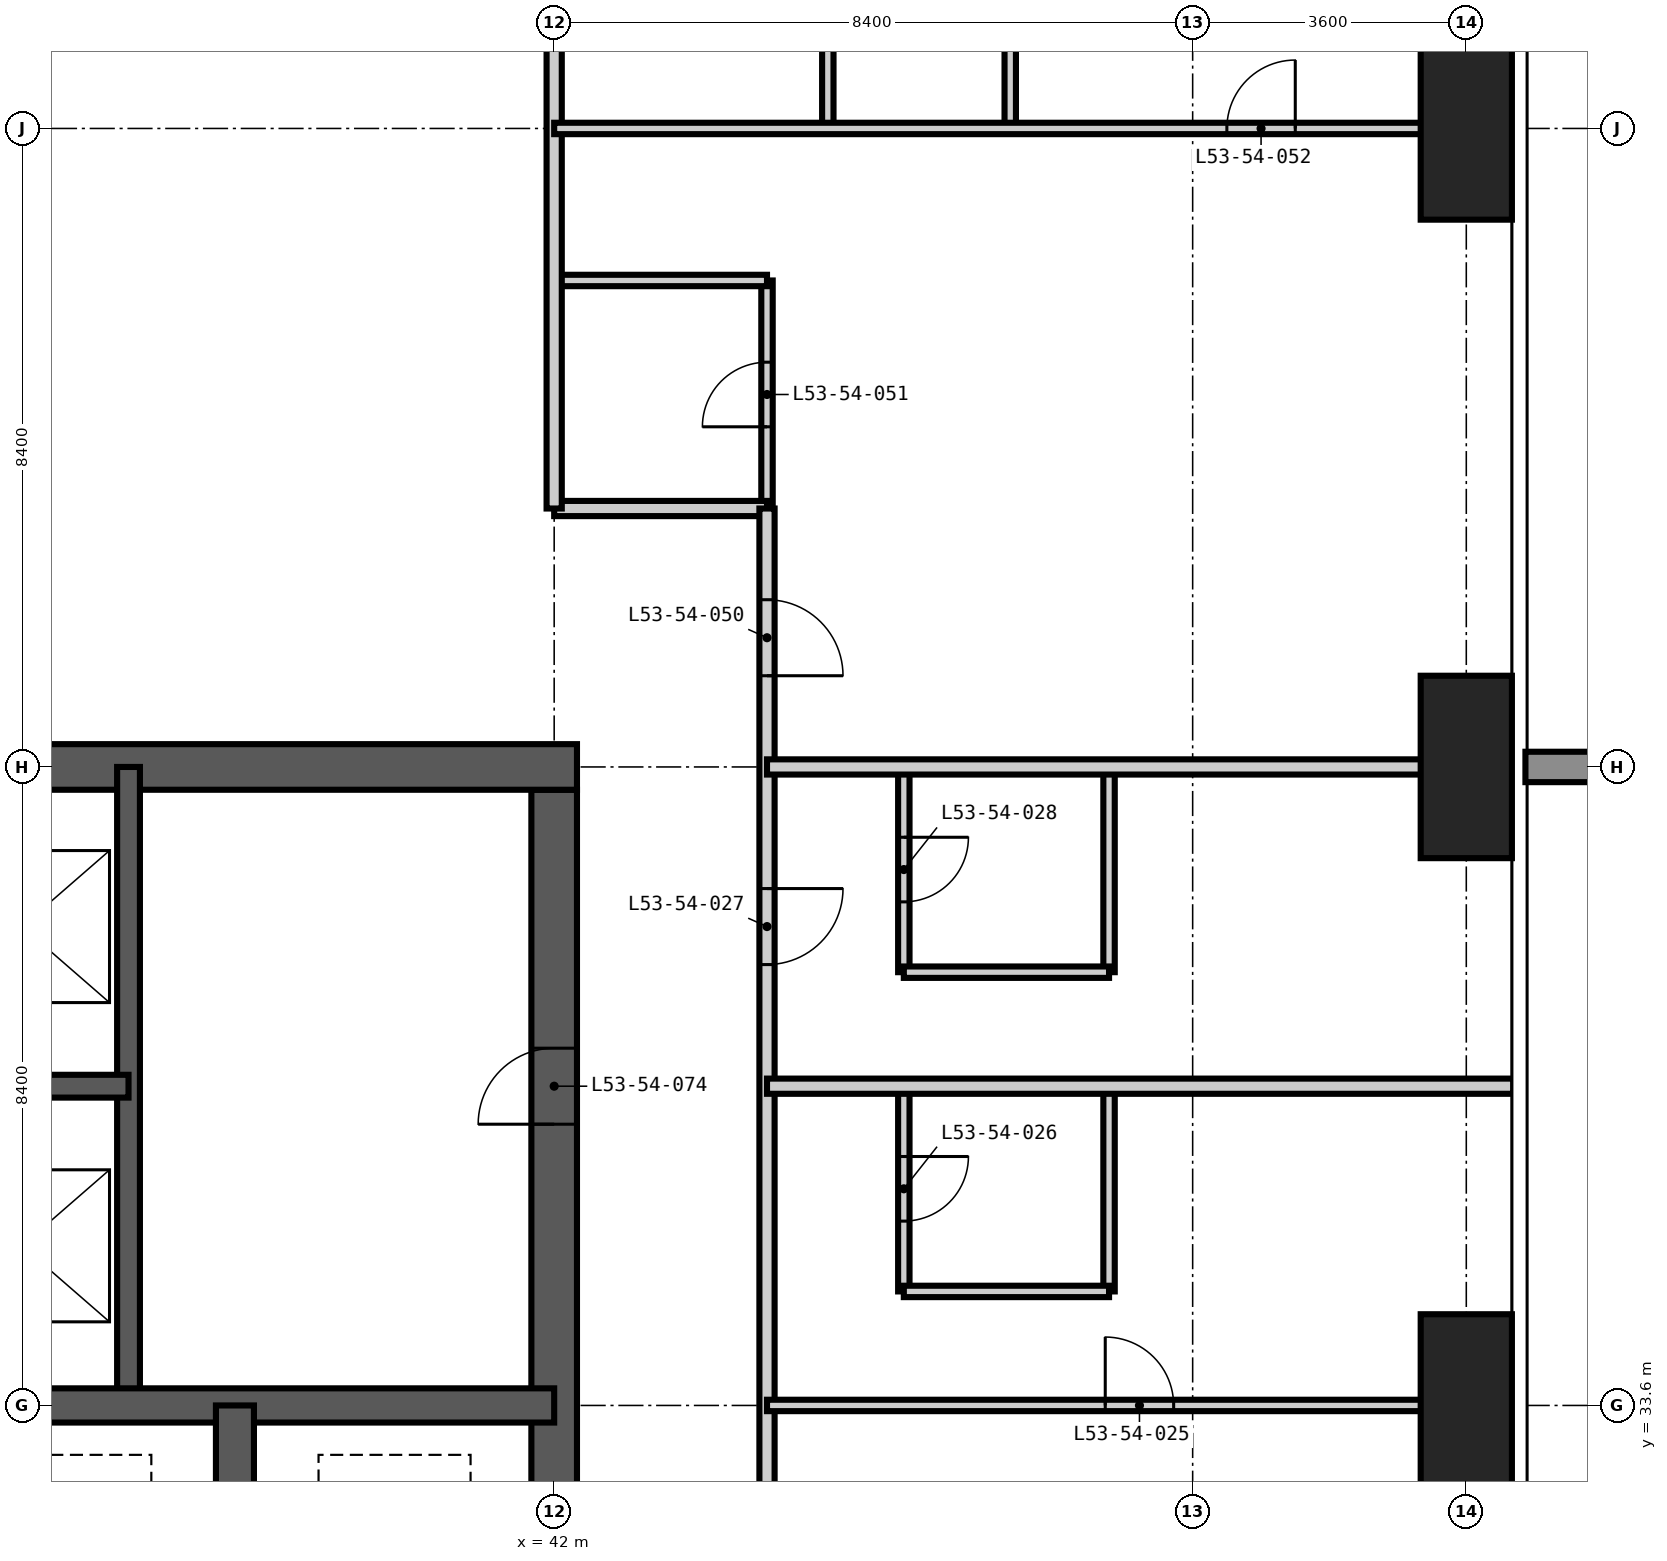
"""IFC4 building model, lengths in metres.
Left out: names, types, materials, properties, quantities, classifications, styles, units other than length and angle.
Written with IfcOpenShell. Run it as: python <this file> out.ifc"""

import sys

from ifc_helpers import new_model, si_unit, direction, frame, frame_2d, origin, origin_2d, place, context, subcontext, project, spatial, rectangle, extrude, element, fill, save


model = new_model("IFC4")
c1 = context("Model", 3, precision=1e-05, world=origin(), true_north=direction((0.0, 1.0)))
c2 = subcontext(c1, "Body", "Model", "MODEL_VIEW")
j1 = project(units=[si_unit("LENGTHUNIT", "METRE"), si_unit("PLANEANGLEUNIT", "RADIAN")], contexts=[c1])
p1 = place(None, origin())
s1 = spatial("IfcSite", under=j1, at=p1, CompositionType="ELEMENT")
p2 = place(p1, origin())
s2 = spatial("IfcBuilding", under=s1, at=p2, CompositionType="ELEMENT")
p3 = place(p2, frame((0.0, 0.0, 205.8)))
s3 = spatial("IfcBuildingStorey", under=s2, at=p3, CompositionType="ELEMENT", Elevation=205.8)
for number, where, z_axis, x_axis in (
    (1, (54.0, 33.6, -0.35), (0.0, 0.0, 1.0), (1.0, 0.0, 0.0)),
    (2, (54.0, 42.0, -0.35), (0.0, 0.0, 1.0), (1.0, 0.0, 0.0)),
    (3, (54.0, 50.4, -0.35), (0.0, 0.0, 1.0), (1.0, 0.0, 0.0)),
):
    element("IfcColumn", number, at=place(p3, frame(where, z_axis=z_axis, x_axis=x_axis)), inside=s3, PredefinedType="COLUMN", context=c2, shape_type="SweptSolid", body=[
        extrude(rectangle(XDim=1.2, YDim=2.4, at=origin_2d()), origin(), (0.0, 0.0, 1.0), 3.6),
    ])
p4 = place(p3, frame((42.0, 17.1, -0.35), z_axis=(0.0, 0.0, 1.0), x_axis=(0.0, 1.0, 0.0)))
e4 = element("IfcWall", 4, at=p4, inside=s3, PredefinedType="SHEAR", context=c2, shape_type="SweptSolid", body=[
    extrude(rectangle(XDim=24.6, YDim=0.6, at=frame_2d((12.3, 0.0))), origin(), (0.0, 0.0, 1.0), 3.6),
])
p5 = place(p4, frame((0.5, 0.0, 0.35)))
e5 = element("IfcOpeningElement", 5, at=p5, cuts=e4, PredefinedType="OPENING", context=c2, shape_type="SweptSolid", body=[
    extrude(rectangle(XDim=1.2, YDim=2.2, at=frame_2d((0.6, 1.1))), frame((0.0, 0.31, 0.0), z_axis=(0.0, -1.0, 0.0), x_axis=(1.0, 0.0, 0.0)), (0.0, 0.0, 1.0), 0.62),
])
p6 = place(p4, frame((11.8, 0.0, 0.35)))
e6 = element("IfcOpeningElement", 6, at=p6, cuts=e4, PredefinedType="OPENING", context=c2, shape_type="SweptSolid", body=[
    extrude(rectangle(XDim=1.0, YDim=2.1, at=frame_2d((0.5, 1.05))), frame((0.0, 0.31, 0.0), z_axis=(0.0, -1.0, 0.0), x_axis=(1.0, 0.0, 0.0)), (0.0, 0.0, 1.0), 0.62),
])
p7 = place(p4, frame((20.2, 0.0, 0.35)))
e7 = element("IfcOpeningElement", 7, at=p7, cuts=e4, PredefinedType="OPENING", context=c2, shape_type="SweptSolid", body=[
    extrude(rectangle(XDim=1.0, YDim=2.1, at=frame_2d((0.5, 1.05))), frame((0.0, 0.31, 0.0), z_axis=(0.0, -1.0, 0.0), x_axis=(1.0, 0.0, 0.0)), (0.0, 0.0, 1.0), 0.62),
])
p8 = place(p3, frame((42.3, 42.0, -0.35), z_axis=(0.0, 0.0, 1.0), x_axis=(-1.0, 0.0, 0.0)))
e8 = element("IfcWall", 8, at=p8, inside=s3, PredefinedType="SHEAR", context=c2, shape_type="SweptSolid", body=[
    extrude(rectangle(XDim=25.8, YDim=0.6, at=frame_2d((12.9, 0.0))), origin(), (0.0, 0.0, 1.0), 3.6),
])
p9 = place(p8, frame((20.8, 0.0, 0.35)))
e9 = element("IfcOpeningElement", 9, at=p9, cuts=e8, PredefinedType="OPENING", context=c2, shape_type="SweptSolid", body=[
    extrude(rectangle(XDim=1.0, YDim=2.1, at=frame_2d((0.5, 1.05))), frame((0.0, 0.31, 0.0), z_axis=(0.0, -1.0, 0.0), x_axis=(1.0, 0.0, 0.0)), (0.0, 0.0, 1.0), 0.62),
])
p10 = place(p8, frame((10.2, 0.0, 0.35)))
e10 = element("IfcOpeningElement", 10, at=p10, cuts=e8, PredefinedType="OPENING", context=c2, shape_type="SweptSolid", body=[
    extrude(rectangle(XDim=1.2, YDim=2.2, at=frame_2d((0.6, 1.1))), frame((0.0, 0.31, 0.0), z_axis=(0.0, -1.0, 0.0), x_axis=(1.0, 0.0, 0.0)), (0.0, 0.0, 1.0), 0.62),
])
p11 = place(p3, frame((36.4, 33.6, -0.35), z_axis=(0.0, 0.0, 1.0), x_axis=(0.0, 1.0, 0.0)))
e11 = element("IfcWall", 11, at=p11, inside=s3, PredefinedType="SHEAR", context=c2, shape_type="SweptSolid", body=[
    extrude(rectangle(XDim=8.4, YDim=0.3, at=frame_2d((4.2, 0.0))), origin(), (0.0, 0.0, 1.0), 3.6),
])
p12 = place(p3, frame((33.6, 37.8, -0.35), z_axis=(0.0, 0.0, 1.0), x_axis=(1.0, 0.0, 0.0)))
e12 = element("IfcWall", 12, at=p12, inside=s3, PredefinedType="SHEAR", context=c2, shape_type="SweptSolid", body=[
    extrude(rectangle(XDim=2.8, YDim=0.3, at=frame_2d((1.4, 0.0))), origin(), (0.0, 0.0, 1.0), 3.6),
])
p13 = place(p3, frame((16.8, 33.6, -0.35), z_axis=(0.0, 0.0, 1.0), x_axis=(1.0, 0.0, 0.0)))
e13 = element("IfcWall", 13, at=p13, inside=s3, PredefinedType="SHEAR", context=c2, shape_type="SweptSolid", body=[
    extrude(rectangle(XDim=25.2, YDim=0.45, at=frame_2d((12.6, 0.0))), origin(), (0.0, 0.0, 1.0), 3.6),
])
p14 = place(p3, frame((37.8, 30.8, -0.35), z_axis=(0.0, 0.0, 1.0), x_axis=(0.0, 1.0, 0.0)))
e14 = element("IfcWall", 14, at=p14, inside=s3, PredefinedType="SHEAR", context=c2, shape_type="SweptSolid", body=[
    extrude(rectangle(XDim=2.8, YDim=0.5, at=frame_2d((1.4, 0.0))), origin(), (0.0, 0.0, 1.0), 3.6),
])
p15 = place(p3, frame((44.8, 45.4, 0.0), z_axis=(0.0, 0.0, 1.0), x_axis=(0.0, 1.0, 0.0)))
e15 = element("IfcWall", 15, at=p15, inside=s3, PredefinedType="PARTITIONING", context=c2, shape_type="SweptSolid", body=[
    extrude(rectangle(XDim=3.0, YDim=0.15, at=frame_2d((1.5, 0.0))), origin(), (0.0, 0.0, 1.0), 3.25),
])
p16 = place(p15, frame((1.075, 0.0, 0.0)))
e16 = element("IfcOpeningElement", 16, at=p16, cuts=e15, PredefinedType="OPENING", context=c2, shape_type="SweptSolid", body=[
    extrude(rectangle(XDim=0.85, YDim=2.1, at=frame_2d((0.425, 1.05))), frame((0.0, 0.085, 0.0), z_axis=(0.0, -1.0, 0.0), x_axis=(1.0, 0.0, 0.0)), (0.0, 0.0, 1.0), 0.17),
])
p17 = place(p3, frame((46.6, 35.1, 0.0), z_axis=(0.0, 0.0, 1.0), x_axis=(0.0, 1.0, 0.0)))
e17 = element("IfcWall", 17, at=p17, inside=s3, PredefinedType="PARTITIONING", context=c2, shape_type="SweptSolid", body=[
    extrude(rectangle(XDim=2.7, YDim=0.15, at=frame_2d((1.35, 0.0))), origin(), (0.0, 0.0, 1.0), 3.25),
])
p18 = place(p17, frame((0.925, 0.0, 0.0)))
e18 = element("IfcOpeningElement", 18, at=p18, cuts=e17, PredefinedType="OPENING", context=c2, shape_type="SweptSolid", body=[
    extrude(rectangle(XDim=0.85, YDim=2.1, at=frame_2d((0.425, 1.05))), frame((0.0, 0.085, 0.0), z_axis=(0.0, -1.0, 0.0), x_axis=(1.0, 0.0, 0.0)), (0.0, 0.0, 1.0), 0.17),
])
p19 = place(p3, frame((46.6, 39.3, 0.0), z_axis=(0.0, 0.0, 1.0), x_axis=(0.0, 1.0, 0.0)))
e19 = element("IfcWall", 19, at=p19, inside=s3, PredefinedType="PARTITIONING", context=c2, shape_type="SweptSolid", body=[
    extrude(rectangle(XDim=2.7, YDim=0.15, at=frame_2d((1.35, 0.0))), origin(), (0.0, 0.0, 1.0), 3.25),
])
p20 = place(p19, frame((0.925, 0.0, 0.0)))
e20 = element("IfcOpeningElement", 20, at=p20, cuts=e19, PredefinedType="OPENING", context=c2, shape_type="SweptSolid", body=[
    extrude(rectangle(XDim=0.85, YDim=2.1, at=frame_2d((0.425, 1.05))), frame((0.0, 0.085, 0.0), z_axis=(0.0, -1.0, 0.0), x_axis=(1.0, 0.0, 0.0)), (0.0, 0.0, 1.0), 0.17),
])
for number, where, z_axis, x_axis in (
    (21, (49.3, 35.1, 0.0), (0.0, 0.0, 1.0), (0.0, 1.0, 0.0)),
    (22, (49.3, 39.3, 0.0), (0.0, 0.0, 1.0), (0.0, 1.0, 0.0)),
    (23, (46.6, 35.1, 0.0), (0.0, 0.0, 1.0), (1.0, 0.0, 0.0)),
    (24, (46.6, 39.3, 0.0), (0.0, 0.0, 1.0), (1.0, 0.0, 0.0)),
):
    element("IfcWall", number, at=place(p3, frame(where, z_axis=z_axis, x_axis=x_axis)), inside=s3, PredefinedType="PARTITIONING", context=c2, shape_type="SweptSolid", body=[
        extrude(rectangle(XDim=2.7, YDim=0.15, at=frame_2d((1.35, 0.0))), origin(), (0.0, 0.0, 1.0), 3.25),
    ])
p21 = place(p3, frame((42.0, 48.4, 0.0), z_axis=(0.0, 0.0, 1.0), x_axis=(1.0, 0.0, 0.0)))
e25 = element("IfcWall", 25, at=p21, inside=s3, PredefinedType="PARTITIONING", context=c2, shape_type="SweptSolid", body=[
    extrude(rectangle(XDim=2.8, YDim=0.15, at=frame_2d((1.4, 0.0))), origin(), (0.0, 0.0, 1.0), 3.25),
])
p22 = place(p3, frame((42.0, 45.4, 0.0), z_axis=(0.0, 0.0, 1.0), x_axis=(1.0, 0.0, 0.0)))
e26 = element("IfcWall", 26, at=p22, inside=s3, PredefinedType="PARTITIONING", context=c2, shape_type="SweptSolid", body=[
    extrude(rectangle(XDim=2.8, YDim=0.2, at=frame_2d((1.4, 0.0))), origin(), (0.0, 0.0, 1.0), 3.25),
])
p23 = place(p3, frame((42.0, 54.618, 0.0), z_axis=(0.0, 0.0, 1.0), x_axis=(0.0, -1.0, 0.0)))
e27 = element("IfcWall", 27, at=p23, inside=s3, PredefinedType="PARTITIONING", context=c2, shape_type="SweptSolid", body=[
    extrude(rectangle(XDim=9.218, YDim=0.2, at=frame_2d((4.609, 0.0))), origin(), (0.0, 0.0, 1.0), 3.25),
])
p24 = place(p3, frame((44.8, 45.4, 0.0), z_axis=(0.0, 0.0, 1.0), x_axis=(0.0, -1.0, 0.0)))
e28 = element("IfcWall", 28, at=p24, inside=s3, PredefinedType="PARTITIONING", context=c2, shape_type="SweptSolid", body=[
    extrude(rectangle(XDim=30.8, YDim=0.2, at=frame_2d((15.4, 0.0))), origin(), (0.0, 0.0, 1.0), 3.25),
])
p25 = place(p24, frame((26.0, 0.0, 0.0)))
e29 = element("IfcOpeningElement", 29, at=p25, cuts=e28, PredefinedType="OPENING", context=c2, shape_type="SweptSolid", body=[
    extrude(rectangle(XDim=1.0, YDim=2.2, at=frame_2d((0.5, 1.1))), frame((0.0, 0.11, 0.0), z_axis=(0.0, -1.0, 0.0), x_axis=(1.0, 0.0, 0.0)), (0.0, 0.0, 1.0), 0.22),
])
p26 = place(p24, frame((21.8, 0.0, 0.0)))
e30 = element("IfcOpeningElement", 30, at=p26, cuts=e28, PredefinedType="OPENING", context=c2, shape_type="SweptSolid", body=[
    extrude(rectangle(XDim=1.0, YDim=2.2, at=frame_2d((0.5, 1.1))), frame((0.0, 0.11, 0.0), z_axis=(0.0, -1.0, 0.0), x_axis=(1.0, 0.0, 0.0)), (0.0, 0.0, 1.0), 0.22),
])
p27 = place(p24, frame((16.7, 0.0, 0.0)))
e31 = element("IfcOpeningElement", 31, at=p27, cuts=e28, PredefinedType="OPENING", context=c2, shape_type="SweptSolid", body=[
    extrude(rectangle(XDim=1.0, YDim=2.2, at=frame_2d((0.5, 1.1))), frame((0.0, 0.11, 0.0), z_axis=(0.0, -1.0, 0.0), x_axis=(1.0, 0.0, 0.0)), (0.0, 0.0, 1.0), 0.22),
])
p28 = place(p24, frame((5.0, 0.0, 0.0)))
e32 = element("IfcOpeningElement", 32, at=p28, cuts=e28, PredefinedType="OPENING", context=c2, shape_type="SweptSolid", body=[
    extrude(rectangle(XDim=1.0, YDim=2.2, at=frame_2d((0.5, 1.1))), frame((0.0, 0.11, 0.0), z_axis=(0.0, -1.0, 0.0), x_axis=(1.0, 0.0, 0.0)), (0.0, 0.0, 1.0), 0.22),
])
p29 = place(p24, frame((29.2, 0.0, 0.0)))
e33 = element("IfcOpeningElement", 33, at=p29, cuts=e28, PredefinedType="OPENING", context=c2, shape_type="SweptSolid", body=[
    extrude(rectangle(XDim=1.0, YDim=2.2, at=frame_2d((0.5, 1.1))), frame((0.0, 0.11, 0.0), z_axis=(0.0, -1.0, 0.0), x_axis=(1.0, 0.0, 0.0)), (0.0, 0.0, 1.0), 0.22),
])
p30 = place(p24, frame((1.2, 0.0, 0.0)))
e34 = element("IfcOpeningElement", 34, at=p30, cuts=e28, PredefinedType="OPENING", context=c2, shape_type="SweptSolid", body=[
    extrude(rectangle(XDim=1.0, YDim=2.2, at=frame_2d((0.5, 1.1))), frame((0.0, 0.11, 0.0), z_axis=(0.0, -1.0, 0.0), x_axis=(1.0, 0.0, 0.0)), (0.0, 0.0, 1.0), 0.22),
])
for number, where, z_axis, x_axis in (
    (35, (44.8, 37.8, 0.0), (0.0, 0.0, 1.0), (1.0, 0.0, 0.0)),
    (36, (44.8, 42.0, 0.0), (0.0, 0.0, 1.0), (1.0, 0.0, 0.0)),
):
    element("IfcWall", number, at=place(p3, frame(where, z_axis=z_axis, x_axis=x_axis)), inside=s3, PredefinedType="PARTITIONING", context=c2, shape_type="SweptSolid", body=[
        extrude(rectangle(XDim=9.818, YDim=0.2, at=frame_2d((4.909, 0.0))), origin(), (0.0, 0.0, 1.0), 3.25),
    ])
p31 = place(p3, frame((45.6, 50.4, 0.0), z_axis=(0.0, 0.0, 1.0), x_axis=(0.0, 1.0, 0.0)))
e37 = element("IfcWall", 37, at=p31, inside=s3, PredefinedType="PARTITIONING", context=c2, shape_type="SweptSolid", body=[
    extrude(rectangle(XDim=3.0, YDim=0.15, at=frame_2d((1.5, 0.0))), origin(), (0.0, 0.0, 1.0), 3.25),
])
p32 = place(p3, frame((48.0, 50.4, 0.0), z_axis=(0.0, 0.0, 1.0), x_axis=(0.0, 1.0, 0.0)))
e38 = element("IfcWall", 38, at=p32, inside=s3, PredefinedType="PARTITIONING", context=c2, shape_type="SweptSolid", body=[
    extrude(rectangle(XDim=3.0, YDim=0.15, at=frame_2d((1.5, 0.0))), origin(), (0.0, 0.0, 1.0), 3.25),
])
p33 = place(p32, frame((1.05, 0.0, 0.0)))
e39 = element("IfcOpeningElement", 39, at=p33, cuts=e38, PredefinedType="OPENING", context=c2, shape_type="SweptSolid", body=[
    extrude(rectangle(XDim=0.9, YDim=2.1, at=frame_2d((0.45, 1.05))), frame((0.0, 0.085, 0.0), z_axis=(0.0, -1.0, 0.0), x_axis=(1.0, 0.0, 0.0)), (0.0, 0.0, 1.0), 0.17),
])
p34 = place(p3, frame((44.8, 33.6, 0.0), z_axis=(0.0, 0.0, 1.0), x_axis=(1.0, 0.0, 0.0)))
e40 = element("IfcWall", 40, at=p34, inside=s3, PredefinedType="PARTITIONING", context=c2, shape_type="SweptSolid", body=[
    extrude(rectangle(XDim=9.818, YDim=0.15, at=frame_2d((4.909, 0.0))), origin(), (0.0, 0.0, 1.0), 3.25),
])
p35 = place(p34, frame((4.45, 0.0, 0.0)))
e41 = element("IfcOpeningElement", 41, at=p35, cuts=e40, PredefinedType="OPENING", context=c2, shape_type="SweptSolid", body=[
    extrude(rectangle(XDim=0.9, YDim=2.1, at=frame_2d((0.45, 1.05))), frame((0.0, 0.085, 0.0), z_axis=(0.0, -1.0, 0.0), x_axis=(1.0, 0.0, 0.0)), (0.0, 0.0, 1.0), 0.17),
])
p36 = place(p3, frame((42.0, 50.4, 0.0), z_axis=(0.0, 0.0, 1.0), x_axis=(1.0, 0.0, 0.0)))
e42 = element("IfcWall", 42, at=p36, inside=s3, PredefinedType="PARTITIONING", context=c2, shape_type="SweptSolid", body=[
    extrude(rectangle(XDim=12.618, YDim=0.15, at=frame_2d((6.309, 0.0))), origin(), (0.0, 0.0, 1.0), 3.25),
])
p37 = place(p36, frame((8.85, 0.0, 0.0)))
e43 = element("IfcOpeningElement", 43, at=p37, cuts=e42, PredefinedType="OPENING", context=c2, shape_type="SweptSolid", body=[
    extrude(rectangle(XDim=0.9, YDim=2.1, at=frame_2d((0.45, 1.05))), frame((0.0, 0.085, 0.0), z_axis=(0.0, -1.0, 0.0), x_axis=(1.0, 0.0, 0.0)), (0.0, 0.0, 1.0), 0.17),
])
p38 = place(p35, origin())
e44 = element("IfcDoor", 44, at=p38, inside=s3, OperationType="SINGLE_SWING_LEFT", PredefinedType="DOOR", context=c2, shape_type="SweptSolid", body=[
    extrude(rectangle(XDim=0.9, YDim=2.1, at=frame_2d((0.45, 1.05))), frame((0.0, 0.025, 0.0), z_axis=(0.0, -1.0, 0.0), x_axis=(1.0, 0.0, 0.0)), (0.0, 0.0, 1.0), 0.05),
])
fill(e41, e44)
p39 = place(p18, frame((0.85, 0.0, 0.0), z_axis=(0.0, 0.0, 1.0), x_axis=(-1.0, 0.0, 0.0)))
e45 = element("IfcDoor", 45, at=p39, inside=s3, OperationType="SINGLE_SWING_LEFT", PredefinedType="DOOR", context=c2, shape_type="SweptSolid", body=[
    extrude(rectangle(XDim=0.85, YDim=2.1, at=frame_2d((0.425, 1.05))), frame((0.0, 0.025, 0.0), z_axis=(0.0, -1.0, 0.0), x_axis=(1.0, 0.0, 0.0)), (0.0, 0.0, 1.0), 0.05),
])
fill(e18, e45)
p40 = place(p28, origin())
e46 = element("IfcDoor", 46, at=p40, inside=s3, OperationType="SINGLE_SWING_LEFT", PredefinedType="DOOR", context=c2, shape_type="SweptSolid", body=[
    extrude(rectangle(XDim=1.0, YDim=2.2, at=frame_2d((0.5, 1.1))), frame((0.0, 0.025, 0.0), z_axis=(0.0, -1.0, 0.0), x_axis=(1.0, 0.0, 0.0)), (0.0, 0.0, 1.0), 0.05),
])
fill(e32, e46)
p41 = place(p20, frame((0.85, 0.0, 0.0), z_axis=(0.0, 0.0, 1.0), x_axis=(-1.0, 0.0, 0.0)))
e47 = element("IfcDoor", 47, at=p41, inside=s3, OperationType="SINGLE_SWING_LEFT", PredefinedType="DOOR", context=c2, shape_type="SweptSolid", body=[
    extrude(rectangle(XDim=0.85, YDim=2.1, at=frame_2d((0.425, 1.05))), frame((0.0, 0.025, 0.0), z_axis=(0.0, -1.0, 0.0), x_axis=(1.0, 0.0, 0.0)), (0.0, 0.0, 1.0), 0.05),
])
fill(e20, e47)
p42 = place(p30, origin())
e48 = element("IfcDoor", 48, at=p42, inside=s3, OperationType="SINGLE_SWING_RIGHT", PredefinedType="DOOR", context=c2, shape_type="SweptSolid", body=[
    extrude(rectangle(XDim=1.0, YDim=2.2, at=frame_2d((0.5, 1.1))), frame((0.0, 0.025, 0.0), z_axis=(0.0, -1.0, 0.0), x_axis=(1.0, 0.0, 0.0)), (0.0, 0.0, 1.0), 0.05),
])
fill(e34, e48)
p43 = place(p16, origin())
e49 = element("IfcDoor", 49, at=p43, inside=s3, OperationType="SINGLE_SWING_LEFT", PredefinedType="DOOR", context=c2, shape_type="SweptSolid", body=[
    extrude(rectangle(XDim=0.85, YDim=2.1, at=frame_2d((0.425, 1.05))), frame((0.0, 0.025, 0.0), z_axis=(0.0, -1.0, 0.0), x_axis=(1.0, 0.0, 0.0)), (0.0, 0.0, 1.0), 0.05),
])
fill(e16, e49)
p44 = place(p37, origin())
e50 = element("IfcDoor", 50, at=p44, inside=s3, OperationType="SINGLE_SWING_RIGHT", PredefinedType="DOOR", context=c2, shape_type="SweptSolid", body=[
    extrude(rectangle(XDim=0.9, YDim=2.1, at=frame_2d((0.45, 1.05))), frame((0.0, 0.025, 0.0), z_axis=(0.0, -1.0, 0.0), x_axis=(1.0, 0.0, 0.0)), (0.0, 0.0, 1.0), 0.05),
])
fill(e43, e50)
p45 = place(p7, origin())
e51 = element("IfcDoor", 51, at=p45, inside=s3, OperationType="SINGLE_SWING_LEFT", PredefinedType="DOOR", context=c2, shape_type="SweptSolid", body=[
    extrude(rectangle(XDim=1.0, YDim=2.1, at=frame_2d((0.5, 1.05))), frame((0.0, 0.025, 0.0), z_axis=(0.0, -1.0, 0.0), x_axis=(1.0, 0.0, 0.0)), (0.0, 0.0, 1.0), 0.05),
])
fill(e7, e51)
save(model, sys.argv[1])
